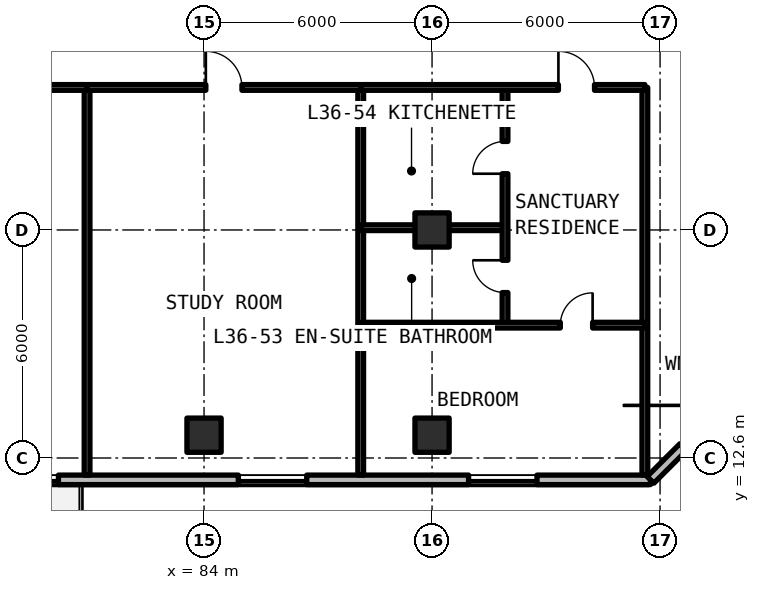
"""IFC4 building model, lengths in metres.
Left out: names, types, materials, properties, quantities, classifications, styles, units other than length and angle.
Written with IfcOpenShell. Run it as: python <this file> out.ifc"""

import sys

from ifc_helpers import new_model, si_unit, direction, frame, frame_2d, origin, origin_2d, place, context, subcontext, project, spatial, rectangle, extrude, element, fill, save


model = new_model("IFC4")
c1 = context("Model", 3, precision=1e-05, world=origin(), true_north=direction((0.0, 1.0)))
c2 = subcontext(c1, "Body", "Model", "MODEL_VIEW")
j1 = project(units=[si_unit("LENGTHUNIT", "METRE"), si_unit("PLANEANGLEUNIT", "RADIAN")], contexts=[c1])
p1 = place(None, origin())
s1 = spatial("IfcSite", under=j1, at=p1, CompositionType="ELEMENT")
p2 = place(p1, origin())
s2 = spatial("IfcBuilding", under=s1, at=p2, CompositionType="ELEMENT")
p3 = place(p2, frame((0.0, 0.0, 132.0)))
s3 = spatial("IfcBuildingStorey", under=s2, at=p3, CompositionType="ELEMENT", Elevation=132.0)
for number, where, z_axis, x_axis in (
    (1, (90.0, 18.6, 0.0), (0.0, 0.0, 1.0), (1.0, 0.0, 0.0)),
    (2, (84.0, 13.2, 0.0), (0.0, 0.0, 1.0), (1.0, 0.0, 0.0)),
    (3, (90.0, 13.2, 0.0), (0.0, 0.0, 1.0), (1.0, 0.0, 0.0)),
):
    element("IfcColumn", number, at=place(p3, frame(where, z_axis=z_axis, x_axis=x_axis)), inside=s3, PredefinedType="COLUMN", context=c2, shape_type="SweptSolid", body=[
        extrude(rectangle(XDim=0.9, YDim=0.9, at=origin_2d()), origin(), (0.0, 0.0, 1.0), 3.3),
    ])
p4 = place(p3, frame((52.125, 12.025, 0.0), z_axis=(0.0, 0.0, 1.0), x_axis=(1.0, 0.0, 0.0)))
e4 = element("IfcWall", 4, at=p4, inside=s3, PredefinedType="SOLIDWALL", context=c2, shape_type="SweptSolid", body=[
    extrude(rectangle(XDim=43.623, YDim=0.25, at=frame_2d((21.812, 0.0))), origin(), (0.0, 0.0, 1.0), 3.08),
])
p5 = place(p4, frame((10.925, 0.0, 0.0)))
e5 = element("IfcOpeningElement", 5, at=p5, cuts=e4, PredefinedType="OPENING", context=c2, shape_type="SweptSolid", body=[
    extrude(rectangle(XDim=1.1, YDim=2.15, at=frame_2d((0.55, 1.075))), frame((0.0, 0.135, 0.0), z_axis=(0.0, -1.0, 0.0), x_axis=(1.0, 0.0, 0.0)), (0.0, 0.0, 1.0), 0.27),
])
p6 = place(p4, frame((22.025, 0.0, 0.0)))
e6 = element("IfcOpeningElement", 6, at=p6, cuts=e4, PredefinedType="OPENING", context=c2, shape_type="SweptSolid", body=[
    extrude(rectangle(XDim=1.1, YDim=2.15, at=frame_2d((0.55, 1.075))), frame((0.0, 0.135, 0.0), z_axis=(0.0, -1.0, 0.0), x_axis=(1.0, 0.0, 0.0)), (0.0, 0.0, 1.0), 0.27),
])
p7 = place(p4, frame((2.738, 0.0, 0.78)))
e7 = element("IfcOpeningElement", 7, at=p7, cuts=e4, PredefinedType="OPENING", context=c2, shape_type="SweptSolid", body=[
    extrude(rectangle(XDim=1.8, YDim=1.66, at=frame_2d((0.9, 0.83))), frame((0.0, 0.135, 0.0), z_axis=(0.0, -1.0, 0.0), x_axis=(1.0, 0.0, 0.0)), (0.0, 0.0, 1.0), 0.27),
])
p8 = place(p4, frame((8.443, 0.0, 0.78)))
e8 = element("IfcOpeningElement", 8, at=p8, cuts=e4, PredefinedType="OPENING", context=c2, shape_type="SweptSolid", body=[
    extrude(rectangle(XDim=0.85, YDim=1.65, at=frame_2d((0.425, 0.825))), frame((0.0, 0.135, 0.0), z_axis=(0.0, -1.0, 0.0), x_axis=(1.0, 0.0, 0.0)), (0.0, 0.0, 1.0), 0.27),
])
p9 = place(p4, frame((14.879, 0.0, 0.78)))
e9 = element("IfcOpeningElement", 9, at=p9, cuts=e4, PredefinedType="OPENING", context=c2, shape_type="SweptSolid", body=[
    extrude(rectangle(XDim=0.85, YDim=1.65, at=frame_2d((0.425, 0.825))), frame((0.0, 0.135, 0.0), z_axis=(0.0, -1.0, 0.0), x_axis=(1.0, 0.0, 0.0)), (0.0, 0.0, 1.0), 0.27),
])
p10 = place(p4, frame((17.184, 0.0, 0.78)))
e10 = element("IfcOpeningElement", 10, at=p10, cuts=e4, PredefinedType="OPENING", context=c2, shape_type="SweptSolid", body=[
    extrude(rectangle(XDim=1.8, YDim=1.66, at=frame_2d((0.9, 0.83))), frame((0.0, 0.135, 0.0), z_axis=(0.0, -1.0, 0.0), x_axis=(1.0, 0.0, 0.0)), (0.0, 0.0, 1.0), 0.27),
])
p11 = place(p4, frame((26.643, 0.0, 0.78)))
e11 = element("IfcOpeningElement", 11, at=p11, cuts=e4, PredefinedType="OPENING", context=c2, shape_type="SweptSolid", body=[
    extrude(rectangle(XDim=1.4, YDim=1.65, at=frame_2d((0.7, 0.825))), frame((0.0, 0.135, 0.0), z_axis=(0.0, -1.0, 0.0), x_axis=(1.0, 0.0, 0.0)), (0.0, 0.0, 1.0), 0.27),
])
p12 = place(p4, frame((32.777, 0.0, 0.78)))
e12 = element("IfcOpeningElement", 12, at=p12, cuts=e4, PredefinedType="OPENING", context=c2, shape_type="SweptSolid", body=[
    extrude(rectangle(XDim=1.8, YDim=1.66, at=frame_2d((0.9, 0.83))), frame((0.0, 0.135, 0.0), z_axis=(0.0, -1.0, 0.0), x_axis=(1.0, 0.0, 0.0)), (0.0, 0.0, 1.0), 0.27),
])
p13 = place(p4, frame((38.836, 0.0, 0.78)))
e13 = element("IfcOpeningElement", 13, at=p13, cuts=e4, PredefinedType="OPENING", context=c2, shape_type="SweptSolid", body=[
    extrude(rectangle(XDim=1.8, YDim=1.66, at=frame_2d((0.9, 0.83))), frame((0.0, 0.135, 0.0), z_axis=(0.0, -1.0, 0.0), x_axis=(1.0, 0.0, 0.0)), (0.0, 0.0, 1.0), 0.27),
])
p14 = place(p3, frame((95.748, 12.025, 0.0), z_axis=(0.0, 0.0, 1.0), x_axis=(0.70708586489, 0.707127696864, 0.0)))
e14 = element("IfcWall", 14, at=p14, inside=s3, PredefinedType="SOLIDWALL", context=c2, shape_type="SweptSolid", body=[
    extrude(rectangle(XDim=5.836, YDim=0.25, at=frame_2d((2.918, 0.0))), origin(), (0.0, 0.0, 1.0), 3.08),
])
p15 = place(p14, frame((1.218, 0.0, 0.78)))
e15 = element("IfcOpeningElement", 15, at=p15, cuts=e14, PredefinedType="OPENING", context=c2, shape_type="SweptSolid", body=[
    extrude(rectangle(XDim=3.4, YDim=1.66, at=frame_2d((1.7, 0.83))), frame((0.0, 0.135, 0.0), z_axis=(0.0, -1.0, 0.0), x_axis=(1.0, 0.0, 0.0)), (0.0, 0.0, 1.0), 0.27),
])
for number, where, z_axis, x_axis in (
    (16, (95.6, 12.15, 0.0), (0.0, 0.0, 1.0), (0.0, 1.0, 0.0)),
    (17, (80.922, 12.15, 0.0), (0.0, 0.0, 1.0), (0.0, 1.0, 0.0)),
):
    element("IfcWall", number, at=place(p3, frame(where, z_axis=z_axis, x_axis=x_axis)), inside=s3, PredefinedType="SOLIDWALL", context=c2, shape_type="SweptSolid", body=[
        extrude(rectangle(XDim=10.2, YDim=0.15, at=frame_2d((5.1, 0.0))), origin(), (0.0, 0.0, 1.0), 2.35),
    ])
p16 = place(p3, frame((73.445, 22.35, 0.0), z_axis=(0.0, 0.0, 1.0), x_axis=(1.0, 0.0, 0.0)))
e18 = element("IfcWall", 18, at=p16, inside=s3, PredefinedType="SOLIDWALL", context=c2, shape_type="SweptSolid", body=[
    extrude(rectangle(XDim=7.478, YDim=0.15, at=frame_2d((3.739, 0.0))), origin(), (0.0, 0.0, 1.0), 2.35),
])
p17 = place(p16, frame((4.479, 0.0, 0.0)))
e19 = element("IfcOpeningElement", 19, at=p17, cuts=e18, PredefinedType="OPENING", context=c2, shape_type="SweptSolid", body=[
    extrude(rectangle(XDim=0.95, YDim=2.15, at=frame_2d((0.475, 1.075))), frame((0.0, 0.085, 0.0), z_axis=(0.0, -1.0, 0.0), x_axis=(1.0, 0.0, 0.0)), (0.0, 0.0, 1.0), 0.17),
])
p18 = place(p3, frame((88.123, 12.15, 0.0), z_axis=(0.0, 0.0, 1.0), x_axis=(0.0, 1.0, 0.0)))
e20 = element("IfcWall", 20, at=p18, inside=s3, PredefinedType="SOLIDWALL", context=c2, shape_type="SweptSolid", body=[
    extrude(rectangle(XDim=10.2, YDim=0.15, at=frame_2d((5.1, 0.0))), origin(), (0.0, 0.0, 1.0), 2.35),
])
p19 = place(p3, frame((80.922, 22.35, 0.0), z_axis=(0.0, 0.0, 1.0), x_axis=(1.0, 0.0, 0.0)))
e21 = element("IfcWall", 21, at=p19, inside=s3, PredefinedType="SOLIDWALL", context=c2, shape_type="SweptSolid", body=[
    extrude(rectangle(XDim=7.2, YDim=0.15, at=frame_2d((3.6, 0.0))), origin(), (0.0, 0.0, 1.0), 2.35),
])
p20 = place(p19, frame((3.125, 0.0, 0.0)))
e22 = element("IfcOpeningElement", 22, at=p20, cuts=e21, PredefinedType="OPENING", context=c2, shape_type="SweptSolid", body=[
    extrude(rectangle(XDim=0.95, YDim=2.15, at=frame_2d((0.475, 1.075))), frame((0.0, 0.085, 0.0), z_axis=(0.0, -1.0, 0.0), x_axis=(1.0, 0.0, 0.0)), (0.0, 0.0, 1.0), 0.17),
])
p21 = place(p3, frame((88.123, 18.66, 0.0), z_axis=(0.0, 0.0, 1.0), x_axis=(1.0, 0.0, 0.0)))
e23 = element("IfcWall", 23, at=p21, inside=s3, PredefinedType="PARTITIONING", context=c2, shape_type="SweptSolid", body=[
    extrude(rectangle(XDim=3.797, YDim=0.15, at=frame_2d((1.899, 0.0))), origin(), (0.0, 0.0, 1.0), 2.35),
])
p22 = place(p3, frame((91.92, 16.095, 0.0), z_axis=(0.0, 0.0, 1.0), x_axis=(0.0, 1.0, 0.0)))
e24 = element("IfcWall", 24, at=p22, inside=s3, PredefinedType="PARTITIONING", context=c2, shape_type="SweptSolid", body=[
    extrude(rectangle(XDim=6.255, YDim=0.15, at=frame_2d((3.127, 0.0))), origin(), (0.0, 0.0, 1.0), 2.35),
])
p23 = place(p22, frame((0.857, 0.0, 0.0)))
e25 = element("IfcOpeningElement", 25, at=p23, cuts=e24, PredefinedType="OPENING", context=c2, shape_type="SweptSolid", body=[
    extrude(rectangle(XDim=0.85, YDim=2.1, at=frame_2d((0.425, 1.05))), frame((0.0, 0.085, 0.0), z_axis=(0.0, -1.0, 0.0), x_axis=(1.0, 0.0, 0.0)), (0.0, 0.0, 1.0), 0.17),
])
p24 = place(p22, frame((3.985, 0.0, 0.0)))
e26 = element("IfcOpeningElement", 26, at=p24, cuts=e24, PredefinedType="OPENING", context=c2, shape_type="SweptSolid", body=[
    extrude(rectangle(XDim=0.85, YDim=2.1, at=frame_2d((0.425, 1.05))), frame((0.0, 0.085, 0.0), z_axis=(0.0, -1.0, 0.0), x_axis=(1.0, 0.0, 0.0)), (0.0, 0.0, 1.0), 0.17),
])
p25 = place(p3, frame((88.123, 16.095, 0.0), z_axis=(0.0, 0.0, 1.0), x_axis=(1.0, 0.0, 0.0)))
e27 = element("IfcWall", 27, at=p25, inside=s3, PredefinedType="PARTITIONING", context=c2, shape_type="SweptSolid", body=[
    extrude(rectangle(XDim=7.478, YDim=0.15, at=frame_2d((3.739, 0.0))), origin(), (0.0, 0.0, 1.0), 2.35),
])
p26 = place(p25, frame((5.252, 0.0, 0.0)))
e28 = element("IfcOpeningElement", 28, at=p26, cuts=e27, PredefinedType="OPENING", context=c2, shape_type="SweptSolid", body=[
    extrude(rectangle(XDim=0.85, YDim=2.1, at=frame_2d((0.425, 1.05))), frame((0.0, 0.085, 0.0), z_axis=(0.0, -1.0, 0.0), x_axis=(1.0, 0.0, 0.0)), (0.0, 0.0, 1.0), 0.17),
])
p27 = place(p3, frame((88.123, 22.35, 0.0), z_axis=(0.0, 0.0, 1.0), x_axis=(1.0, 0.0, 0.0)))
e29 = element("IfcWall", 29, at=p27, inside=s3, PredefinedType="SOLIDWALL", context=c2, shape_type="SweptSolid", body=[
    extrude(rectangle(XDim=7.478, YDim=0.15, at=frame_2d((3.739, 0.0))), origin(), (0.0, 0.0, 1.0), 2.35),
])
p28 = place(p27, frame((5.202, 0.0, 0.0)))
e30 = element("IfcOpeningElement", 30, at=p28, cuts=e29, PredefinedType="OPENING", context=c2, shape_type="SweptSolid", body=[
    extrude(rectangle(XDim=0.95, YDim=2.15, at=frame_2d((0.475, 1.075))), frame((0.0, 0.085, 0.0), z_axis=(0.0, -1.0, 0.0), x_axis=(1.0, 0.0, 0.0)), (0.0, 0.0, 1.0), 0.17),
])
p29 = place(p11, origin())
e31 = element("IfcWindow", 31, at=p29, inside=s3, PartitioningType="SINGLE_PANEL", PredefinedType="WINDOW", context=c2, shape_type="SweptSolid", body=[
    extrude(rectangle(XDim=1.4, YDim=1.65, at=frame_2d((0.7, 0.825))), frame((0.0, 0.03, 0.0), z_axis=(0.0, -1.0, 0.0), x_axis=(1.0, 0.0, 0.0)), (0.0, 0.0, 1.0), 0.06),
])
fill(e11, e31)
p30 = place(p12, origin())
e32 = element("IfcWindow", 32, at=p30, inside=s3, PartitioningType="SINGLE_PANEL", PredefinedType="WINDOW", context=c2, shape_type="SweptSolid", body=[
    extrude(rectangle(XDim=1.8, YDim=1.66, at=frame_2d((0.9, 0.83))), frame((0.0, 0.03, 0.0), z_axis=(0.0, -1.0, 0.0), x_axis=(1.0, 0.0, 0.0)), (0.0, 0.0, 1.0), 0.06),
])
fill(e12, e32)
p31 = place(p13, origin())
e33 = element("IfcWindow", 33, at=p31, inside=s3, PartitioningType="SINGLE_PANEL", PredefinedType="WINDOW", context=c2, shape_type="SweptSolid", body=[
    extrude(rectangle(XDim=1.8, YDim=1.66, at=frame_2d((0.9, 0.83))), frame((0.0, 0.03, 0.0), z_axis=(0.0, -1.0, 0.0), x_axis=(1.0, 0.0, 0.0)), (0.0, 0.0, 1.0), 0.06),
])
fill(e13, e33)
p32 = place(p20, origin())
e34 = element("IfcDoor", 34, at=p32, inside=s3, OperationType="SINGLE_SWING_LEFT", PredefinedType="DOOR", context=c2, shape_type="SweptSolid", body=[
    extrude(rectangle(XDim=0.95, YDim=2.15, at=frame_2d((0.475, 1.075))), frame((0.0, 0.025, 0.0), z_axis=(0.0, -1.0, 0.0), x_axis=(1.0, 0.0, 0.0)), (0.0, 0.0, 1.0), 0.05),
])
fill(e22, e34)
p33 = place(p23, origin())
e35 = element("IfcDoor", 35, at=p33, inside=s3, OperationType="SINGLE_SWING_RIGHT", PredefinedType="DOOR", context=c2, shape_type="SweptSolid", body=[
    extrude(rectangle(XDim=0.85, YDim=2.1, at=frame_2d((0.425, 1.05))), frame((0.0, 0.025, 0.0), z_axis=(0.0, -1.0, 0.0), x_axis=(1.0, 0.0, 0.0)), (0.0, 0.0, 1.0), 0.05),
])
fill(e25, e35)
p34 = place(p24, origin())
e36 = element("IfcDoor", 36, at=p34, inside=s3, OperationType="SINGLE_SWING_LEFT", PredefinedType="DOOR", context=c2, shape_type="SweptSolid", body=[
    extrude(rectangle(XDim=0.85, YDim=2.1, at=frame_2d((0.425, 1.05))), frame((0.0, 0.025, 0.0), z_axis=(0.0, -1.0, 0.0), x_axis=(1.0, 0.0, 0.0)), (0.0, 0.0, 1.0), 0.05),
])
fill(e26, e36)
p35 = place(p26, origin())
e37 = element("IfcDoor", 37, at=p35, inside=s3, OperationType="SINGLE_SWING_RIGHT", PredefinedType="DOOR", context=c2, shape_type="SweptSolid", body=[
    extrude(rectangle(XDim=0.85, YDim=2.1, at=frame_2d((0.425, 1.05))), frame((0.0, 0.025, 0.0), z_axis=(0.0, -1.0, 0.0), x_axis=(1.0, 0.0, 0.0)), (0.0, 0.0, 1.0), 0.05),
])
fill(e28, e37)
p36 = place(p28, origin())
e38 = element("IfcDoor", 38, at=p36, inside=s3, OperationType="SINGLE_SWING_LEFT", PredefinedType="DOOR", context=c2, shape_type="SweptSolid", body=[
    extrude(rectangle(XDim=0.95, YDim=2.15, at=frame_2d((0.475, 1.075))), frame((0.0, 0.025, 0.0), z_axis=(0.0, -1.0, 0.0), x_axis=(1.0, 0.0, 0.0)), (0.0, 0.0, 1.0), 0.05),
])
fill(e30, e38)
save(model, sys.argv[1])
